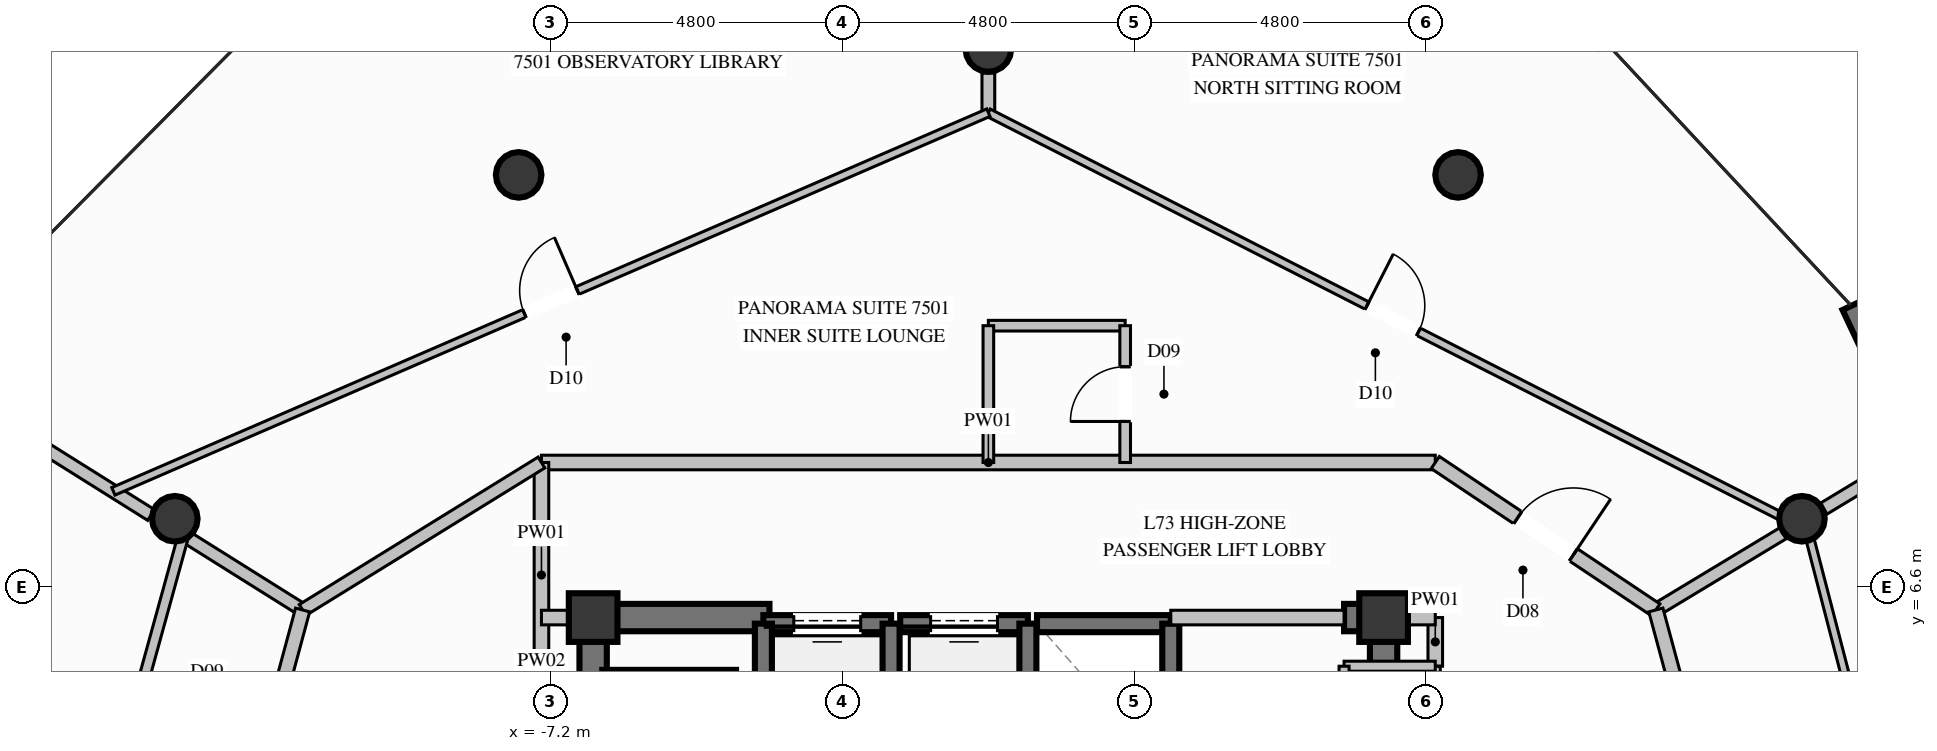
"""IFC4 building model, lengths in metres.
Left out: names, types, materials, properties, quantities, classifications, styles, units other than length and angle.
Written with IfcOpenShell. Run it as: python <this file> out.ifc"""

import sys

from ifc_helpers import new_model, si_unit, direction, frame, frame_2d, origin, origin_2d, place, context, subcontext, project, spatial, rectangle, circle, extrude, element, fill, save


model = new_model("IFC4")
c1 = context("Model", 3, precision=1e-05, world=origin(), true_north=direction((0.0, 1.0)))
c2 = subcontext(c1, "Body", "Model", "MODEL_VIEW")
j1 = project(units=[si_unit("LENGTHUNIT", "METRE"), si_unit("PLANEANGLEUNIT", "RADIAN")], contexts=[c1])
p1 = place(None, origin())
s1 = spatial("IfcSite", under=j1, at=p1, CompositionType="ELEMENT")
p2 = place(p1, origin())
s2 = spatial("IfcBuilding", under=s1, at=p2, CompositionType="ELEMENT")
p3 = place(p2, frame((0.0, 0.0, 282.0)))
s3 = spatial("IfcBuildingStorey", under=s2, at=p3, CompositionType="ELEMENT", Elevation=282.0)
for number, where, z_axis, x_axis in (
    (1, (6.5, 6.1, 0.0), (0.0, 0.0, 1.0), (1.0, 0.0, 0.0)),
    (2, (-6.5, 6.1, 0.0), (0.0, 0.0, 1.0), (1.0, 0.0, 0.0)),
):
    element("IfcColumn", number, at=place(p3, frame(where, z_axis=z_axis, x_axis=x_axis)), inside=s3, PredefinedType="COLUMN", context=c2, shape_type="SweptSolid", body=[
        extrude(rectangle(XDim=0.8, YDim=0.8, at=origin_2d()), origin(), (0.0, 0.0, 1.0), 3.8),
    ])
p4 = place(p3, frame((-6.275, 6.1, 0.0), z_axis=(0.0, 0.0, 1.0), x_axis=(1.0, 0.0, 0.0)))
e3 = element("IfcWall", 3, at=p4, inside=s3, PredefinedType="SHEAR", context=c2, shape_type="SweptSolid", body=[
    extrude(rectangle(XDim=2.675, YDim=0.45, at=frame_2d((1.337, 0.0))), origin(), (0.0, 0.0, 1.0), 3.8),
])
p5 = place(p3, frame((5.85, 6.1, 0.0), z_axis=(0.0, 0.0, 1.0), x_axis=(1.0, 0.0, 0.0)))
e4 = element("IfcWall", 4, at=p5, inside=s3, PredefinedType="SHEAR", context=c2, shape_type="SweptSolid", body=[
    extrude(rectangle(XDim=0.425, YDim=0.45, at=frame_2d((0.212, 0.0))), origin(), (0.0, 0.0, 1.0), 3.8),
])
p6 = place(p3, frame((-6.5, 2.35, 0.0), z_axis=(0.0, 0.0, 1.0), x_axis=(0.0, 1.0, 0.0)))
e5 = element("IfcWall", 5, at=p6, inside=s3, PredefinedType="SHEAR", context=c2, shape_type="SweptSolid", body=[
    extrude(rectangle(XDim=3.975, YDim=0.45, at=frame_2d((1.987, 0.0))), origin(), (0.0, 0.0, 1.0), 3.8),
])
p7 = place(p3, frame((6.5, 3.35, 0.0), z_axis=(0.0, 0.0, 1.0), x_axis=(0.0, 1.0, 0.0)))
e6 = element("IfcWall", 6, at=p7, inside=s3, PredefinedType="SHEAR", context=c2, shape_type="SweptSolid", body=[
    extrude(rectangle(XDim=2.975, YDim=0.45, at=frame_2d((1.487, 0.0))), origin(), (0.0, 0.0, 1.0), 3.8),
])
for number, where, z_axis, x_axis in (
    (7, (13.38, 7.725, 0.0), (0.0, 0.0, 1.0), (1.0, 0.0, 0.0)),
    (8, (7.725, 13.38, 0.0), (0.0, 0.0, 1.0), (1.0, 0.0, 0.0)),
    (9, (0.0, 15.45, 0.0), (0.0, 0.0, 1.0), (1.0, 0.0, 0.0)),
    (10, (-7.725, 13.38, 0.0), (0.0, 0.0, 1.0), (1.0, 0.0, 0.0)),
    (11, (-13.38, 7.725, 0.0), (0.0, 0.0, 1.0), (1.0, 0.0, 0.0)),
):
    element("IfcColumn", number, at=place(p3, frame(where, z_axis=z_axis, x_axis=x_axis)), inside=s3, PredefinedType="COLUMN", context=c2, shape_type="SweptSolid", body=[
        extrude(circle(Radius=0.375, at=origin_2d()), origin(), (0.0, 0.0, 1.0), 3.8),
    ])
p8 = place(p3, frame((14.193, 11.227, 0.0), z_axis=(0.0, 0.0, 1.0), x_axis=(0.426183517714, -0.904636727769, 0.0)))
e12 = element("IfcWall", 12, at=p8, inside=s3, PredefinedType="SOLIDWALL", context=c2, shape_type="SweptSolid", body=[
    extrude(rectangle(XDim=6.053, YDim=0.32, at=frame_2d((3.027, 0.0))), origin(), (0.0, 0.0, 1.0), 3.57),
])
p9 = place(p8, frame((3.496, 0.0, 0.35)))
e13 = element("IfcOpeningElement", 13, at=p9, cuts=e12, PredefinedType="OPENING", context=c2, shape_type="SweptSolid", body=[
    extrude(rectangle(XDim=1.8, YDim=2.6, at=frame_2d((0.9, 1.3))), frame((0.0, 0.17, 0.0), z_axis=(0.0, -1.0, 0.0), x_axis=(1.0, 0.0, 0.0)), (0.0, 0.0, 1.0), 0.34),
])
p10 = place(p3, frame((-1.6, 6.0, 0.0), z_axis=(0.0, 0.0, 1.0), x_axis=(-1.0, 0.0, 0.0)))
e14 = element("IfcWall", 14, at=p10, inside=s3, PredefinedType="SOLIDWALL", context=c2, shape_type="SweptSolid", body=[
    extrude(rectangle(XDim=2.1, YDim=0.28, at=frame_2d((1.05, 0.0))), origin(), (0.0, 0.0, 1.0), 3.57),
])
p11 = place(p10, frame((0.5, 0.0, 0.0)))
e15 = element("IfcOpeningElement", 15, at=p11, cuts=e14, PredefinedType="OPENING", context=c2, shape_type="SweptSolid", body=[
    extrude(rectangle(XDim=1.1, YDim=2.2, at=frame_2d((0.55, 1.1))), frame((0.0, 0.15, 0.0), z_axis=(0.0, -1.0, 0.0), x_axis=(1.0, 0.0, 0.0)), (0.0, 0.0, 1.0), 0.3),
])
for number, where, z_axis, x_axis in (
    (16, (-3.7, 6.0, 0.0), (0.0, 0.0, 1.0), (0.0, -1.0, 0.0)),
    (17, (-1.6, 3.5, 0.0), (0.0, 0.0, 1.0), (0.0, 1.0, 0.0)),
):
    element("IfcWall", number, at=place(p3, frame(where, z_axis=z_axis, x_axis=x_axis)), inside=s3, PredefinedType="SOLIDWALL", context=c2, shape_type="SweptSolid", body=[
        extrude(rectangle(XDim=2.5, YDim=0.28, at=frame_2d((1.25, 0.0))), origin(), (0.0, 0.0, 1.0), 3.57),
    ])
p12 = place(p3, frame((0.65, 6.0, 0.0), z_axis=(0.0, 0.0, 1.0), x_axis=(-1.0, 0.0, 0.0)))
e18 = element("IfcWall", 18, at=p12, inside=s3, PredefinedType="SOLIDWALL", context=c2, shape_type="SweptSolid", body=[
    extrude(rectangle(XDim=2.1, YDim=0.28, at=frame_2d((1.05, 0.0))), origin(), (0.0, 0.0, 1.0), 3.57),
])
p13 = place(p12, frame((0.5, 0.0, 0.0)))
e19 = element("IfcOpeningElement", 19, at=p13, cuts=e18, PredefinedType="OPENING", context=c2, shape_type="SweptSolid", body=[
    extrude(rectangle(XDim=1.1, YDim=2.2, at=frame_2d((0.55, 1.1))), frame((0.0, 0.15, 0.0), z_axis=(0.0, -1.0, 0.0), x_axis=(1.0, 0.0, 0.0)), (0.0, 0.0, 1.0), 0.3),
])
p14 = place(p3, frame((0.65, 3.5, 0.0), z_axis=(0.0, 0.0, 1.0), x_axis=(0.0, 1.0, 0.0)))
e20 = element("IfcWall", 20, at=p14, inside=s3, PredefinedType="SOLIDWALL", context=c2, shape_type="SweptSolid", body=[
    extrude(rectangle(XDim=2.5, YDim=0.28, at=frame_2d((1.25, 0.0))), origin(), (0.0, 0.0, 1.0), 3.57),
])
p15 = place(p3, frame((3.0, 6.0, 0.0), z_axis=(0.0, 0.0, 1.0), x_axis=(-1.0, 0.0, 0.0)))
e21 = element("IfcWall", 21, at=p15, inside=s3, PredefinedType="SOLIDWALL", context=c2, shape_type="SweptSolid", body=[
    extrude(rectangle(XDim=2.2, YDim=0.28, at=frame_2d((1.1, 0.0))), origin(), (0.0, 0.0, 1.0), 3.57),
])
p16 = place(p3, frame((3.0, 3.5, 0.0), z_axis=(0.0, 0.0, 1.0), x_axis=(0.0, 1.0, 0.0)))
e22 = element("IfcWall", 22, at=p16, inside=s3, PredefinedType="SOLIDWALL", context=c2, shape_type="SweptSolid", body=[
    extrude(rectangle(XDim=2.5, YDim=0.28, at=frame_2d((1.25, 0.0))), origin(), (0.0, 0.0, 1.0), 3.57),
])
p17 = place(p3, frame((-4.15, 5.1, 0.0), z_axis=(0.0, 0.0, 1.0), x_axis=(-1.0, 0.0, 0.0)))
e23 = element("IfcWall", 23, at=p17, inside=s3, PredefinedType="SOLIDWALL", context=c2, shape_type="SweptSolid", body=[
    extrude(rectangle(XDim=2.2, YDim=0.28, at=frame_2d((1.1, 0.0))), origin(), (0.0, 0.0, 1.0), 3.57),
])
p18 = place(p3, frame((-7.35, 8.65, 0.0), z_axis=(0.0, 0.0, 1.0), x_axis=(1.0, 0.0, 0.0)))
e24 = element("IfcWall", 24, at=p18, inside=s3, PredefinedType="PARTITIONING", context=c2, shape_type="SweptSolid", body=[
    extrude(rectangle(XDim=14.7, YDim=0.24, at=frame_2d((7.35, 0.0))), origin(), (0.0, 0.0, 1.0), 3.57),
])
p19 = place(p3, frame((3.0, 6.1, 0.0), z_axis=(0.0, 0.0, 1.0), x_axis=(1.0, 0.0, 0.0)))
e25 = element("IfcWall", 25, at=p19, inside=s3, PredefinedType="PARTITIONING", context=c2, shape_type="SweptSolid", body=[
    extrude(rectangle(XDim=2.85, YDim=0.24, at=frame_2d((1.425, 0.0))), origin(), (0.0, 0.0, 1.0), 2.655),
])
p20 = place(p3, frame((7.35, 5.3, 0.0), z_axis=(0.0, 0.0, 1.0), x_axis=(0.0, 1.0, 0.0)))
e26 = element("IfcWall", 26, at=p20, inside=s3, PredefinedType="PARTITIONING", context=c2, shape_type="SweptSolid", body=[
    extrude(rectangle(XDim=0.8, YDim=0.24, at=frame_2d((0.4, 0.0))), origin(), (0.0, 0.0, 1.0), 2.655),
])
p21 = place(p3, frame((6.5, 6.1, 0.0), z_axis=(0.0, 0.0, 1.0), x_axis=(1.0, 0.0, 0.0)))
e27 = element("IfcWall", 27, at=p21, inside=s3, PredefinedType="PARTITIONING", context=c2, shape_type="SweptSolid", body=[
    extrude(rectangle(XDim=0.85, YDim=0.24, at=frame_2d((0.425, 0.0))), origin(), (0.0, 0.0, 1.0), 3.085),
])
p22 = place(p3, frame((-7.35, 4.95, 0.0), z_axis=(0.0, 0.0, 1.0), x_axis=(0.0, 1.0, 0.0)))
e28 = element("IfcWall", 28, at=p22, inside=s3, PredefinedType="PARTITIONING", context=c2, shape_type="SweptSolid", body=[
    extrude(rectangle(XDim=3.7, YDim=0.24, at=frame_2d((1.85, 0.0))), origin(), (0.0, 0.0, 1.0), 2.655),
])
p23 = place(p3, frame((-7.35, 6.1, 0.0), z_axis=(0.0, 0.0, 1.0), x_axis=(1.0, 0.0, 0.0)))
e29 = element("IfcWall", 29, at=p23, inside=s3, PredefinedType="PARTITIONING", context=c2, shape_type="SweptSolid", body=[
    extrude(rectangle(XDim=0.85, YDim=0.24, at=frame_2d((0.425, 0.0))), origin(), (0.0, 0.0, 1.0), 3.085),
])
p24 = place(p3, frame((7.35, 3.35, 0.0), z_axis=(0.0, 0.0, 1.0), x_axis=(0.0, 1.0, 0.0)))
e30 = element("IfcWall", 30, at=p24, inside=s3, PredefinedType="PARTITIONING", context=c2, shape_type="SweptSolid", body=[
    extrude(rectangle(XDim=1.95, YDim=0.165, at=frame_2d((0.975, 0.0))), origin(), (0.0, 0.0, 1.0), 3.57),
])
p25 = place(p24, frame((0.5, 0.0, 0.0)))
e31 = element("IfcOpeningElement", 31, at=p25, cuts=e30, PredefinedType="OPENING", context=c2, shape_type="SweptSolid", body=[
    extrude(rectangle(XDim=0.95, YDim=2.1, at=frame_2d((0.475, 1.05))), frame((0.0, 0.093, 0.0), z_axis=(0.0, -1.0, 0.0), x_axis=(1.0, 0.0, 0.0)), (0.0, 0.0, 1.0), 0.185),
])
p26 = place(p3, frame((7.35, 5.3, 0.0), z_axis=(0.0, 0.0, 1.0), x_axis=(-1.0, 0.0, 0.0)))
e32 = element("IfcWall", 32, at=p26, inside=s3, PredefinedType="PARTITIONING", context=c2, shape_type="SweptSolid", body=[
    extrude(rectangle(XDim=1.5, YDim=0.165, at=frame_2d((0.75, 0.0))), origin(), (0.0, 0.0, 1.0), 2.655),
])
p27 = place(p3, frame((5.85, 5.3, 0.0), z_axis=(0.0, 0.0, 1.0), x_axis=(0.0, -1.0, 0.0)))
e33 = element("IfcWall", 33, at=p27, inside=s3, PredefinedType="PARTITIONING", context=c2, shape_type="SweptSolid", body=[
    extrude(rectangle(XDim=1.95, YDim=0.165, at=frame_2d((0.975, 0.0))), origin(), (0.0, 0.0, 1.0), 2.655),
])
p28 = place(p3, frame((10.978, 6.225, 0.0), z_axis=(0.0, 0.0, 1.0), x_axis=(0.856173916647, 0.516687743664, 0.0)))
e34 = element("IfcWall", 34, at=p28, inside=s3, PredefinedType="PARTITIONING", context=c2, shape_type="SweptSolid", body=[
    extrude(rectangle(XDim=2.439, YDim=0.21, at=frame_2d((1.219, 0.0))), origin(), (0.0, 0.0, 1.0), 3.085),
])
p29 = place(p3, frame((13.738, 7.891, 0.0), z_axis=(0.0, 0.0, 1.0), x_axis=(0.856140161033, 0.516743674045, 0.0)))
e35 = element("IfcWall", 35, at=p29, inside=s3, PredefinedType="PARTITIONING", context=c2, shape_type="SweptSolid", body=[
    extrude(rectangle(XDim=1.803, YDim=0.21, at=frame_2d((0.902, 0.0))), origin(), (0.0, 0.0, 1.0), 3.57),
])
p30 = place(p3, frame((-11.278, 6.225, 0.0), z_axis=(0.0, 0.0, 1.0), x_axis=(-0.847328563413, 0.531069021525, 0.0)))
e36 = element("IfcWall", 36, at=p30, inside=s3, PredefinedType="PARTITIONING", context=c2, shape_type="SweptSolid", body=[
    extrude(rectangle(XDim=2.214, YDim=0.21, at=frame_2d((1.107, 0.0))), origin(), (0.0, 0.0, 1.0), 3.085),
])
p31 = place(p3, frame((-13.77, 7.787, 0.0), z_axis=(0.0, 0.0, 1.0), x_axis=(-0.847251407525, 0.531192105031, 0.0)))
e37 = element("IfcWall", 37, at=p31, inside=s3, PredefinedType="PARTITIONING", context=c2, shape_type="SweptSolid", body=[
    extrude(rectangle(XDim=3.861, YDim=0.21, at=frame_2d((1.93, 0.0))), origin(), (0.0, 0.0, 1.0), 3.57),
])
p32 = place(p3, frame((0.0, 10.9, 0.0), z_axis=(0.0, 0.0, 1.0), x_axis=(1.0, 0.0, 0.0)))
e38 = element("IfcWall", 38, at=p32, inside=s3, PredefinedType="PLUMBINGWALL", context=c2, shape_type="SweptSolid", body=[
    extrude(rectangle(XDim=2.25, YDim=0.175, at=frame_2d((1.125, 0.0))), origin(), (0.0, 0.0, 1.0), 3.252),
])
p33 = place(p3, frame((0.0, 10.9, 0.0), z_axis=(0.0, 0.0, 1.0), x_axis=(0.0, -1.0, 0.0)))
e39 = element("IfcWall", 39, at=p33, inside=s3, PredefinedType="PLUMBINGWALL", context=c2, shape_type="SweptSolid", body=[
    extrude(rectangle(XDim=2.25, YDim=0.175, at=frame_2d((1.125, 0.0))), origin(), (0.0, 0.0, 1.0), 3.57),
])
p34 = place(p3, frame((2.25, 8.65, 0.0), z_axis=(0.0, 0.0, 1.0), x_axis=(0.0, 1.0, 0.0)))
e40 = element("IfcWall", 40, at=p34, inside=s3, PredefinedType="PLUMBINGWALL", context=c2, shape_type="SweptSolid", body=[
    extrude(rectangle(XDim=2.25, YDim=0.175, at=frame_2d((1.125, 0.0))), origin(), (0.0, 0.0, 1.0), 3.57),
])
p35 = place(p34, frame((0.675, 0.0, 0.0)))
e41 = element("IfcOpeningElement", 41, at=p35, cuts=e40, PredefinedType="OPENING", context=c2, shape_type="SweptSolid", body=[
    extrude(rectangle(XDim=0.9, YDim=2.1, at=frame_2d((0.45, 1.05))), frame((0.0, 0.098, 0.0), z_axis=(0.0, -1.0, 0.0), x_axis=(1.0, 0.0, 0.0)), (0.0, 0.0, 1.0), 0.195),
])
p36 = place(p3, frame((-11.278, 6.225, 0.0), z_axis=(0.0, 0.0, 1.0), x_axis=(0.85092385233, 0.525289060933, 0.0)))
e42 = element("IfcWall", 42, at=p36, inside=s3, PredefinedType="PARTITIONING", context=c2, shape_type="SweptSolid", body=[
    extrude(rectangle(XDim=4.616, YDim=0.21, at=frame_2d((2.308, 0.0))), origin(), (0.0, 0.0, 1.0), 3.57),
])
p37 = place(p3, frame((7.35, 8.65, 0.0), z_axis=(0.0, 0.0, 1.0), x_axis=(0.831395547998, -0.555681062094, 0.0)))
e43 = element("IfcWall", 43, at=p37, inside=s3, PredefinedType="PARTITIONING", context=c2, shape_type="SweptSolid", body=[
    extrude(rectangle(XDim=4.364, YDim=0.24, at=frame_2d((2.182, 0.0))), origin(), (0.0, 0.0, 1.0), 3.57),
])
p38 = place(p37, frame((1.632, 0.0, 0.0)))
e44 = element("IfcOpeningElement", 44, at=p38, cuts=e43, PredefinedType="OPENING", context=c2, shape_type="SweptSolid", body=[
    extrude(rectangle(XDim=1.1, YDim=2.3, at=frame_2d((0.55, 1.15))), frame((0.0, 0.13, 0.0), z_axis=(0.0, -1.0, 0.0), x_axis=(1.0, 0.0, 0.0)), (0.0, 0.0, 1.0), 0.26),
])
p39 = place(p3, frame((0.0, 14.403, 0.0), z_axis=(0.0, 0.0, 1.0), x_axis=(0.0, 1.0, 0.0)))
e45 = element("IfcWall", 45, at=p39, inside=s3, PredefinedType="PARTITIONING", context=c2, shape_type="SweptSolid", body=[
    extrude(rectangle(XDim=0.652, YDim=0.21, at=frame_2d((0.326, 0.0))), origin(), (0.0, 0.0, 1.0), 3.57),
])
p40 = place(p3, frame((0.0, 14.403, 0.0), z_axis=(0.0, 0.0, 1.0), x_axis=(0.89107593803, -0.45385424165, 0.0)))
e46 = element("IfcWall", 46, at=p40, inside=s3, PredefinedType="PARTITIONING", context=c2, shape_type="SweptSolid", body=[
    extrude(rectangle(XDim=14.928, YDim=0.135, at=frame_2d((7.464, 0.0))), origin(), (0.0, 0.0, 1.0), 3.085),
])
p41 = place(p40, frame((6.989, 0.0, 0.0)))
e47 = element("IfcOpeningElement", 47, at=p41, cuts=e46, PredefinedType="OPENING", context=c2, shape_type="SweptSolid", body=[
    extrude(rectangle(XDim=0.95, YDim=2.1, at=frame_2d((0.475, 1.05))), frame((0.0, 0.078, 0.0), z_axis=(0.0, -1.0, 0.0), x_axis=(1.0, 0.0, 0.0)), (0.0, 0.0, 1.0), 0.155),
])
p42 = place(p3, frame((-14.39, 8.176, 0.0), z_axis=(0.0, 0.0, 1.0), x_axis=(0.917754899872, 0.397147257022, 0.0)))
e48 = element("IfcWall", 48, at=p42, inside=s3, PredefinedType="PARTITIONING", context=c2, shape_type="SweptSolid", body=[
    extrude(rectangle(XDim=15.679, YDim=0.135, at=frame_2d((7.84, 0.0))), origin(), (0.0, 0.0, 1.0), 3.57),
])
p43 = place(p42, frame((7.365, 0.0, 0.0)))
e49 = element("IfcOpeningElement", 49, at=p43, cuts=e48, PredefinedType="OPENING", context=c2, shape_type="SweptSolid", body=[
    extrude(rectangle(XDim=0.95, YDim=2.1, at=frame_2d((0.475, 1.05))), frame((0.0, 0.078, 0.0), z_axis=(0.0, -1.0, 0.0), x_axis=(1.0, 0.0, 0.0)), (0.0, 0.0, 1.0), 0.155),
])
p44 = place(p3, frame((-11.278, 6.225, 0.0), z_axis=(0.0, 0.0, 1.0), x_axis=(-0.260614169726, -0.965443035367, 0.0)))
e50 = element("IfcWall", 50, at=p44, inside=s3, PredefinedType="PARTITIONING", context=c2, shape_type="SweptSolid", body=[
    extrude(rectangle(XDim=2.774, YDim=0.24, at=frame_2d((1.387, 0.0))), origin(), (0.0, 0.0, 1.0), 3.57),
])
p45 = place(p3, frame((-13.237, 7.453, 0.0), z_axis=(0.0, 0.0, 1.0), x_axis=(-0.265653158595, -0.964068669405, 0.0)))
e51 = element("IfcWall", 51, at=p45, inside=s3, PredefinedType="PLUMBINGWALL", context=c2, shape_type="SweptSolid", body=[
    extrude(rectangle(XDim=3.29, YDim=0.175, at=frame_2d((1.645, 0.0))), origin(), (0.0, 0.0, 1.0), 3.137),
])
p46 = place(p3, frame((12.7, -0.15, 0.0), z_axis=(0.0, 0.0, 1.0), x_axis=(-0.260760959349, 0.965403398626, 0.0)))
e52 = element("IfcWall", 52, at=p46, inside=s3, PredefinedType="PARTITIONING", context=c2, shape_type="SweptSolid", body=[
    extrude(rectangle(XDim=6.604, YDim=0.24, at=frame_2d((3.302, 0.0))), origin(), (0.0, 0.0, 1.0), 3.57),
])
p47 = place(p3, frame((15.447, -0.065, 0.0), z_axis=(0.0, 0.0, 1.0), x_axis=(-0.251126791961, 0.967954200548, 0.0)))
e53 = element("IfcWall", 53, at=p47, inside=s3, PredefinedType="PARTITIONING", context=c2, shape_type="SweptSolid", body=[
    extrude(rectangle(XDim=8.028, YDim=0.135, at=frame_2d((4.014, 0.0))), origin(), (0.0, 0.0, 1.0), 3.137),
])
p48 = place(p47, frame((3.539, 0.0, 0.0)))
e54 = element("IfcOpeningElement", 54, at=p48, cuts=e53, PredefinedType="OPENING", context=c2, shape_type="SweptSolid", body=[
    extrude(rectangle(XDim=0.95, YDim=2.1, at=frame_2d((0.475, 1.05))), frame((0.0, 0.078, 0.0), z_axis=(0.0, -1.0, 0.0), x_axis=(1.0, 0.0, 0.0)), (0.0, 0.0, 1.0), 0.155),
])
p49 = place(p11, origin())
e55 = element("IfcDoor", 55, at=p49, inside=s3, OperationType="SLIDING_TO_LEFT", PredefinedType="DOOR", context=c2, shape_type="SweptSolid", body=[
    extrude(rectangle(XDim=1.1, YDim=2.2, at=frame_2d((0.55, 1.1))), frame((0.0, 0.025, 0.0), z_axis=(0.0, -1.0, 0.0), x_axis=(1.0, 0.0, 0.0)), (0.0, 0.0, 1.0), 0.05),
])
fill(e15, e55)
p50 = place(p13, origin())
e56 = element("IfcDoor", 56, at=p50, inside=s3, OperationType="SLIDING_TO_LEFT", PredefinedType="DOOR", context=c2, shape_type="SweptSolid", body=[
    extrude(rectangle(XDim=1.1, YDim=2.2, at=frame_2d((0.55, 1.1))), frame((0.0, 0.025, 0.0), z_axis=(0.0, -1.0, 0.0), x_axis=(1.0, 0.0, 0.0)), (0.0, 0.0, 1.0), 0.05),
])
fill(e19, e56)
p51 = place(p35, origin())
e57 = element("IfcDoor", 57, at=p51, inside=s3, OperationType="SINGLE_SWING_LEFT", PredefinedType="DOOR", context=c2, shape_type="SweptSolid", body=[
    extrude(rectangle(XDim=0.9, YDim=2.1, at=frame_2d((0.45, 1.05))), frame((0.0, 0.025, 0.0), z_axis=(0.0, -1.0, 0.0), x_axis=(1.0, 0.0, 0.0)), (0.0, 0.0, 1.0), 0.05),
])
fill(e41, e57)
p52 = place(p38, origin())
e58 = element("IfcDoor", 58, at=p52, inside=s3, OperationType="SINGLE_SWING_RIGHT", PredefinedType="DOOR", context=c2, shape_type="SweptSolid", body=[
    extrude(rectangle(XDim=1.1, YDim=2.3, at=frame_2d((0.55, 1.15))), frame((0.0, 0.025, 0.0), z_axis=(0.0, -1.0, 0.0), x_axis=(1.0, 0.0, 0.0)), (0.0, 0.0, 1.0), 0.05),
])
fill(e44, e58)
p53 = place(p41, origin())
e59 = element("IfcDoor", 59, at=p53, inside=s3, OperationType="SINGLE_SWING_LEFT", PredefinedType="DOOR", context=c2, shape_type="SweptSolid", body=[
    extrude(rectangle(XDim=0.95, YDim=2.1, at=frame_2d((0.475, 1.05))), frame((0.0, 0.025, 0.0), z_axis=(0.0, -1.0, 0.0), x_axis=(1.0, 0.0, 0.0)), (0.0, 0.0, 1.0), 0.05),
])
fill(e47, e59)
p54 = place(p43, origin())
e60 = element("IfcDoor", 60, at=p54, inside=s3, OperationType="SINGLE_SWING_RIGHT", PredefinedType="DOOR", context=c2, shape_type="SweptSolid", body=[
    extrude(rectangle(XDim=0.95, YDim=2.1, at=frame_2d((0.475, 1.05))), frame((0.0, 0.025, 0.0), z_axis=(0.0, -1.0, 0.0), x_axis=(1.0, 0.0, 0.0)), (0.0, 0.0, 1.0), 0.05),
])
fill(e49, e60)
save(model, sys.argv[1])
